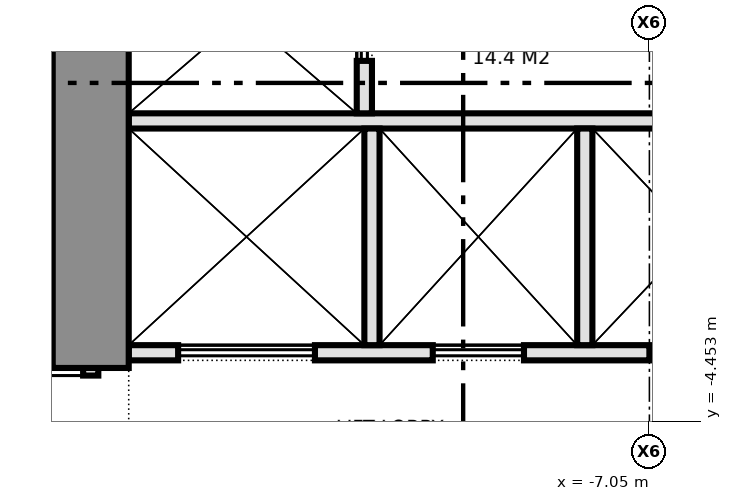
"""IFC4 building model, lengths in metres.
Left out: names, types, materials, properties, quantities, classifications, styles, units other than length and angle.
Written with IfcOpenShell. Run it as: python <this file> out.ifc"""

import sys

from ifc_helpers import new_model, si_unit, direction, frame, frame_2d, origin, place, context, subcontext, project, spatial, rectangle, extrude, element, fill, save


model = new_model("IFC4")
c1 = context("Model", 3, precision=1e-05, world=origin(), true_north=direction((0.0, 1.0)))
c2 = subcontext(c1, "Body", "Model", "MODEL_VIEW")
j1 = project(units=[si_unit("LENGTHUNIT", "METRE"), si_unit("PLANEANGLEUNIT", "RADIAN")], contexts=[c1])
p1 = place(None, origin())
s1 = spatial("IfcSite", under=j1, at=p1, CompositionType="ELEMENT")
p2 = place(p1, origin())
s2 = spatial("IfcBuilding", under=s1, at=p2, CompositionType="ELEMENT")
p3 = place(p2, frame((0.0, 0.0, 99.6)))
s3 = spatial("IfcBuildingStorey", under=s2, at=p3, CompositionType="ELEMENT", Elevation=99.6)
p4 = place(p3, frame((-14.4, -5.75, 0.0), z_axis=(0.0, 0.0, 1.0), x_axis=(0.0, 1.0, 0.0)))
e1 = element("IfcWall", 1, at=p4, inside=s3, PredefinedType="PARTITIONING", context=c2, shape_type="SweptSolid", body=[
    extrude(rectangle(XDim=2.0, YDim=0.2, at=frame_2d((1.0, 0.0))), origin(), (0.0, 0.0, 1.0), 2.4),
])
p5 = place(p4, frame((0.1, 0.0, 0.0)))
e2 = element("IfcOpeningElement", 2, at=p5, cuts=e1, PredefinedType="OPENING", context=c2, shape_type="SweptSolid", body=[
    extrude(rectangle(XDim=1.8, YDim=2.1, at=frame_2d((0.9, 1.05))), frame((0.0, 0.11, 0.0), z_axis=(0.0, -1.0, 0.0), x_axis=(1.0, 0.0, 0.0)), (0.0, 0.0, 1.0), 0.22),
])
p6 = place(p3, frame((-14.4, -3.75, 0.0), z_axis=(0.0, 0.0, 1.0), x_axis=(0.0, 1.0, 0.0)))
e3 = element("IfcWall", 3, at=p6, inside=s3, PredefinedType="SHEAR", context=c2, shape_type="SweptSolid", body=[
    extrude(rectangle(XDim=6.13, YDim=1.0, at=frame_2d((3.065, 0.0))), origin(), (0.0, 0.0, 1.0), 4.2),
])
p7 = place(p3, frame((-13.9, -3.55, 0.0), z_axis=(0.0, 0.0, 1.0), x_axis=(1.0, 0.0, 0.0)))
e4 = element("IfcWall", 4, at=p7, inside=s3, PredefinedType="PARTITIONING", context=c2, shape_type="SweptSolid", body=[
    extrude(rectangle(XDim=8.8, YDim=0.2, at=frame_2d((4.4, 0.0))), origin(), (0.0, 0.0, 1.0), 4.2),
])
p8 = place(p7, frame((0.65, 0.0, 0.0)))
e5 = element("IfcOpeningElement", 5, at=p8, cuts=e4, PredefinedType="OPENING", context=c2, shape_type="SweptSolid", body=[
    extrude(rectangle(XDim=1.8, YDim=2.1, at=frame_2d((0.9, 1.05))), frame((0.0, 0.11, 0.0), z_axis=(0.0, -1.0, 0.0), x_axis=(1.0, 0.0, 0.0)), (0.0, 0.0, 1.0), 0.22),
])
p9 = place(p7, frame((4.0, 0.0, 0.0)))
e6 = element("IfcOpeningElement", 6, at=p9, cuts=e4, PredefinedType="OPENING", context=c2, shape_type="SweptSolid", body=[
    extrude(rectangle(XDim=1.2, YDim=2.1, at=frame_2d((0.6, 1.05))), frame((0.0, 0.11, 0.0), z_axis=(0.0, -1.0, 0.0), x_axis=(1.0, 0.0, 0.0)), (0.0, 0.0, 1.0), 0.22),
])
p10 = place(p7, frame((6.85, 0.0, 0.0)))
e7 = element("IfcOpeningElement", 7, at=p10, cuts=e4, PredefinedType="OPENING", context=c2, shape_type="SweptSolid", body=[
    extrude(rectangle(XDim=1.2, YDim=2.1, at=frame_2d((0.6, 1.05))), frame((0.0, 0.11, 0.0), z_axis=(0.0, -1.0, 0.0), x_axis=(1.0, 0.0, 0.0)), (0.0, 0.0, 1.0), 0.22),
])
p11 = place(p3, frame((-13.9, -0.5, 0.0), z_axis=(0.0, 0.0, 1.0), x_axis=(1.0, 0.0, 0.0)))
e8 = element("IfcWall", 8, at=p11, inside=s3, PredefinedType="PARTITIONING", context=c2, shape_type="SweptSolid", body=[
    extrude(rectangle(XDim=8.8, YDim=0.2, at=frame_2d((4.4, 0.0))), origin(), (0.0, 0.0, 1.0), 4.2),
])
p12 = place(p3, frame((-10.8, -0.4, 0.0), z_axis=(0.0, 0.0, 1.0), x_axis=(0.0, 1.0, 0.0)))
e9 = element("IfcWall", 9, at=p12, inside=s3, PredefinedType="PARTITIONING", context=c2, shape_type="SweptSolid", body=[
    extrude(rectangle(XDim=2.58, YDim=0.2, at=frame_2d((1.29, 0.0))), origin(), (0.0, 0.0, 1.0), 4.2),
])
p13 = place(p12, frame((0.69, 0.0, 0.0)))
e10 = element("IfcOpeningElement", 10, at=p13, cuts=e9, PredefinedType="OPENING", context=c2, shape_type="SweptSolid", body=[
    extrude(rectangle(XDim=1.2, YDim=2.1, at=frame_2d((0.6, 1.05))), frame((0.0, 0.11, 0.0), z_axis=(0.0, -1.0, 0.0), x_axis=(1.0, 0.0, 0.0)), (0.0, 0.0, 1.0), 0.22),
])
for number, where, z_axis, x_axis in (
    (11, (-10.7, -3.45, 0.0), (0.0, 0.0, 1.0), (0.0, 1.0, 0.0)),
    (12, (-7.9, -3.45, 0.0), (0.0, 0.0, 1.0), (0.0, 1.0, 0.0)),
):
    element("IfcWall", number, at=place(p3, frame(where, z_axis=z_axis, x_axis=x_axis)), inside=s3, PredefinedType="PARTITIONING", context=c2, shape_type="SweptSolid", body=[
        extrude(rectangle(XDim=2.85, YDim=0.2, at=frame_2d((1.425, 0.0))), origin(), (0.0, 0.0, 1.0), 4.2),
    ])
p14 = place(p5, origin())
e13 = element("IfcDoor", 13, at=p14, inside=s3, OperationType="DOUBLE_DOOR_SINGLE_SWING", PredefinedType="DOOR", context=c2, shape_type="SweptSolid", body=[
    extrude(rectangle(XDim=1.8, YDim=2.1, at=frame_2d((0.9, 1.05))), frame((0.0, 0.025, 0.0), z_axis=(0.0, -1.0, 0.0), x_axis=(1.0, 0.0, 0.0)), (0.0, 0.0, 1.0), 0.05),
])
fill(e2, e13)
p15 = place(p8, origin())
e14 = element("IfcDoor", 14, at=p15, inside=s3, OperationType="DOUBLE_DOOR_SLIDING", PredefinedType="DOOR", context=c2, shape_type="SweptSolid", body=[
    extrude(rectangle(XDim=1.8, YDim=2.1, at=frame_2d((0.9, 1.05))), frame((0.0, 0.025, 0.0), z_axis=(0.0, -1.0, 0.0), x_axis=(1.0, 0.0, 0.0)), (0.0, 0.0, 1.0), 0.05),
])
fill(e5, e14)
p16 = place(p9, origin())
e15 = element("IfcDoor", 15, at=p16, inside=s3, OperationType="DOUBLE_DOOR_SLIDING", PredefinedType="DOOR", context=c2, shape_type="SweptSolid", body=[
    extrude(rectangle(XDim=1.2, YDim=2.1, at=frame_2d((0.6, 1.05))), frame((0.0, 0.025, 0.0), z_axis=(0.0, -1.0, 0.0), x_axis=(1.0, 0.0, 0.0)), (0.0, 0.0, 1.0), 0.05),
])
fill(e6, e15)
p17 = place(p10, origin())
e16 = element("IfcDoor", 16, at=p17, inside=s3, OperationType="DOUBLE_DOOR_SLIDING", PredefinedType="DOOR", context=c2, shape_type="SweptSolid", body=[
    extrude(rectangle(XDim=1.2, YDim=2.1, at=frame_2d((0.6, 1.05))), frame((0.0, 0.025, 0.0), z_axis=(0.0, -1.0, 0.0), x_axis=(1.0, 0.0, 0.0)), (0.0, 0.0, 1.0), 0.05),
])
fill(e7, e16)
p18 = place(p13, origin())
e17 = element("IfcDoor", 17, at=p18, inside=s3, OperationType="DOUBLE_DOOR_SLIDING", PredefinedType="DOOR", context=c2, shape_type="SweptSolid", body=[
    extrude(rectangle(XDim=1.2, YDim=2.1, at=frame_2d((0.6, 1.05))), frame((0.0, 0.025, 0.0), z_axis=(0.0, -1.0, 0.0), x_axis=(1.0, 0.0, 0.0)), (0.0, 0.0, 1.0), 0.05),
])
fill(e10, e17)
save(model, sys.argv[1])
